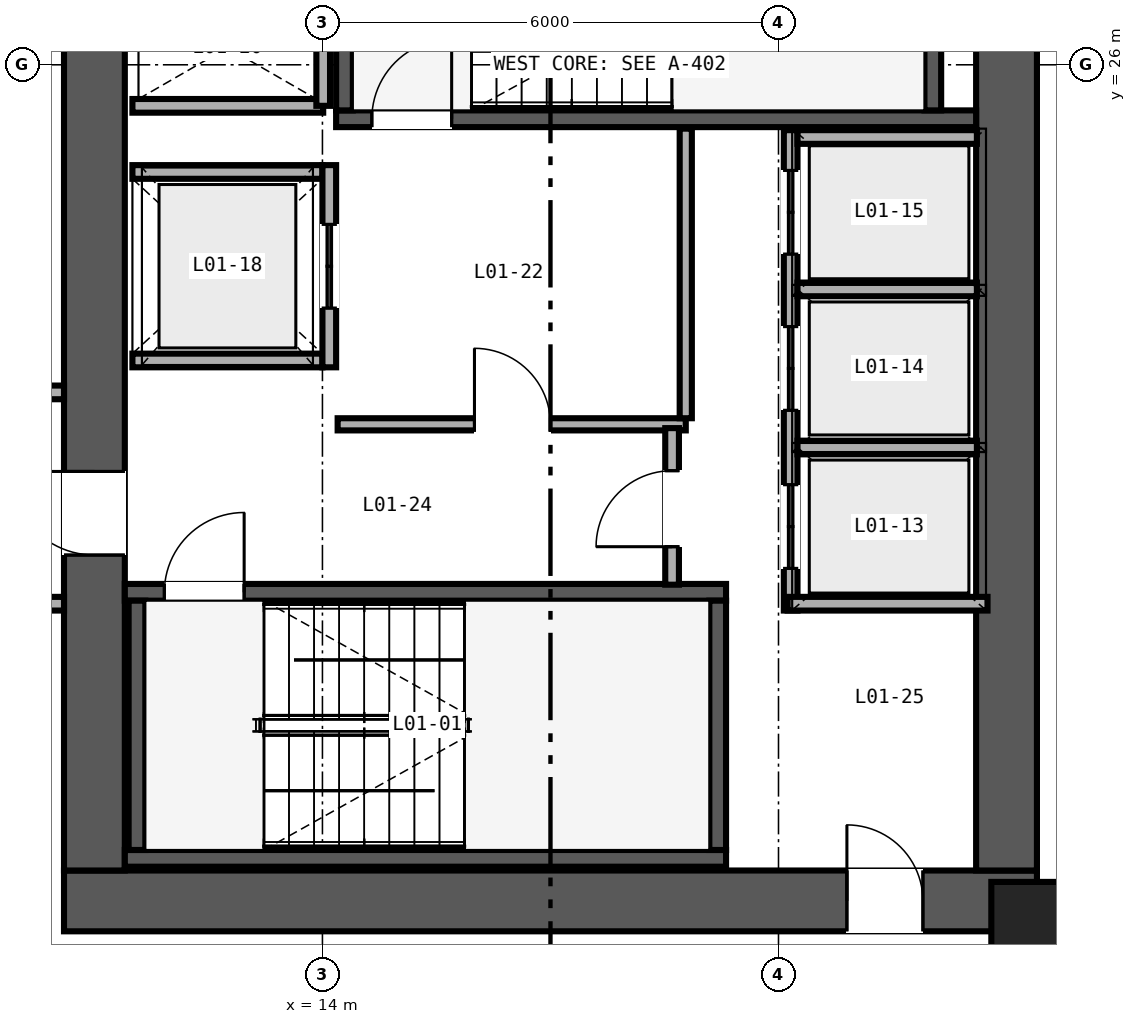
"""IFC4 building model, lengths in metres.
Left out: names, types, materials, properties, quantities, classifications, styles, units other than length and angle.
Written with IfcOpenShell. Run it as: python <this file> out.ifc"""

import sys

from ifc_helpers import new_model, si_unit, direction, frame, frame_2d, origin, origin_2d, place, context, subcontext, project, spatial, rectangle, extrude, source, transform, mapped, element, fill, save


model = new_model("IFC4")
c1 = context("Model", 3, precision=1e-05, world=origin(), true_north=direction((0.0, 1.0)))
c2 = subcontext(c1, "Body", "Model", "MODEL_VIEW")
j1 = project(units=[si_unit("LENGTHUNIT", "METRE"), si_unit("PLANEANGLEUNIT", "RADIAN")], contexts=[c1])
p1 = place(None, origin())
s1 = spatial("IfcSite", under=j1, at=p1, CompositionType="ELEMENT")
p2 = place(p1, origin())
s2 = spatial("IfcBuilding", under=s1, at=p2, CompositionType="ELEMENT")
p3 = place(p2, origin())
s3 = spatial("IfcBuildingStorey", under=s2, at=p3, CompositionType="ELEMENT", Elevation=0.0)
p4 = place(p3, frame((10.6, 15.0, 0.0), z_axis=(0.0, 0.0, 1.0), x_axis=(1.0, 0.0, 0.0)))
e1 = element("IfcWall", 1, at=p4, inside=s3, PredefinedType="SHEAR", context=c2, shape_type="SweptSolid", body=[
    extrude(rectangle(XDim=12.8, YDim=0.8, at=frame_2d((6.4, 0.0))), origin(), (0.0, 0.0, 1.0), 5.71),
])
p5 = place(p4, frame((10.3, 0.0, 0.0)))
e2 = element("IfcOpeningElement", 2, at=p5, cuts=e1, PredefinedType="OPENING", context=c2, shape_type="SweptSolid", body=[
    extrude(rectangle(XDim=1.0, YDim=2.15, at=frame_2d((0.5, 1.075))), frame((0.0, 0.41, 0.0), z_axis=(0.0, -1.0, 0.0), x_axis=(1.0, 0.0, 0.0)), (0.0, 0.0, 1.0), 0.82),
])
p6 = place(p3, frame((11.0, 15.4, 0.0), z_axis=(0.0, 0.0, 1.0), x_axis=(0.0, 1.0, 0.0)))
e3 = element("IfcWall", 3, at=p6, inside=s3, PredefinedType="SHEAR", context=c2, shape_type="SweptSolid", body=[
    extrude(rectangle(XDim=21.2, YDim=0.8, at=frame_2d((10.6, 0.0))), origin(), (0.0, 0.0, 1.0), 5.71),
])
p7 = place(p6, frame((4.15, 0.0, 0.0)))
e4 = element("IfcOpeningElement", 4, at=p7, cuts=e3, PredefinedType="OPENING", context=c2, shape_type="SweptSolid", body=[
    extrude(rectangle(XDim=1.1, YDim=2.15, at=frame_2d((0.55, 1.075))), frame((0.0, 0.41, 0.0), z_axis=(0.0, -1.0, 0.0), x_axis=(1.0, 0.0, 0.0)), (0.0, 0.0, 1.0), 0.82),
])
p8 = place(p6, frame((16.35, 0.0, 0.0)))
e5 = element("IfcOpeningElement", 5, at=p8, cuts=e3, PredefinedType="OPENING", context=c2, shape_type="SweptSolid", body=[
    extrude(rectangle(XDim=1.1, YDim=2.15, at=frame_2d((0.55, 1.075))), frame((0.0, 0.41, 0.0), z_axis=(0.0, -1.0, 0.0), x_axis=(1.0, 0.0, 0.0)), (0.0, 0.0, 1.0), 0.82),
])
p9 = place(p3, frame((23.0, 15.4, 0.0), z_axis=(0.0, 0.0, 1.0), x_axis=(0.0, 1.0, 0.0)))
e6 = element("IfcWall", 6, at=p9, inside=s3, PredefinedType="SHEAR", context=c2, shape_type="SweptSolid", body=[
    extrude(rectangle(XDim=21.2, YDim=0.8, at=frame_2d((10.6, 0.0))), origin(), (0.0, 0.0, 1.0), 5.71),
])
p10 = place(p3, frame((11.4, 15.56, 0.0), z_axis=(0.0, 0.0, 1.0), x_axis=(1.0, 0.0, 0.0)))
e7 = element("IfcWall", 7, at=p10, inside=s3, PredefinedType="SHEAR", context=c2, shape_type="SweptSolid", body=[
    extrude(rectangle(XDim=7.91, YDim=0.22, at=frame_2d((3.955, 0.0))), origin(), (0.0, 0.0, 1.0), 5.8),
])
p11 = place(p3, frame((11.4, 19.06, 0.0), z_axis=(0.0, 0.0, 1.0), x_axis=(1.0, 0.0, 0.0)))
e8 = element("IfcWall", 8, at=p11, inside=s3, PredefinedType="SHEAR", context=c2, shape_type="SweptSolid", body=[
    extrude(rectangle(XDim=7.91, YDim=0.22, at=frame_2d((3.955, 0.0))), origin(), (0.0, 0.0, 1.0), 5.8),
])
p12 = place(p11, frame((0.52, 0.0, 0.0)))
e9 = element("IfcOpeningElement", 9, at=p12, cuts=e8, PredefinedType="OPENING", context=c2, shape_type="SweptSolid", body=[
    extrude(rectangle(XDim=1.05, YDim=2.15, at=frame_2d((0.525, 1.075))), frame((0.0, 0.12, 0.0), z_axis=(0.0, -1.0, 0.0), x_axis=(1.0, 0.0, 0.0)), (0.0, 0.0, 1.0), 0.24),
])
for number, where, z_axis, x_axis in (
    (10, (11.56, 15.67, 0.0), (0.0, 0.0, 1.0), (0.0, 1.0, 0.0)),
    (11, (19.2, 15.67, 0.0), (0.0, 0.0, 1.0), (0.0, 1.0, 0.0)),
):
    element("IfcWall", number, at=place(p3, frame(where, z_axis=z_axis, x_axis=x_axis)), inside=s3, PredefinedType="SHEAR", context=c2, shape_type="SweptSolid", body=[
        extrude(rectangle(XDim=3.28, YDim=0.22, at=frame_2d((1.64, 0.0))), origin(), (0.0, 0.0, 1.0), 5.8),
    ])
p13 = place(p3, frame((14.18, 25.29, 0.0), z_axis=(0.0, 0.0, 1.0), x_axis=(1.0, 0.0, 0.0)))
e12 = element("IfcWall", 12, at=p13, inside=s3, PredefinedType="SHEAR", context=c2, shape_type="SweptSolid", body=[
    extrude(rectangle(XDim=8.42, YDim=0.22, at=frame_2d((4.21, 0.0))), origin(), (0.0, 0.0, 1.0), 5.8),
])
p14 = place(p13, frame((0.47, 0.0, 0.0)))
e13 = element("IfcOpeningElement", 13, at=p14, cuts=e12, PredefinedType="OPENING", context=c2, shape_type="SweptSolid", body=[
    extrude(rectangle(XDim=1.05, YDim=2.15, at=frame_2d((0.525, 1.075))), frame((0.0, 0.12, 0.0), z_axis=(0.0, -1.0, 0.0), x_axis=(1.0, 0.0, 0.0)), (0.0, 0.0, 1.0), 0.24),
])
for number, where, z_axis, x_axis in (
    (14, (14.29, 25.4, 0.0), (0.0, 0.0, 1.0), (0.0, 1.0, 0.0)),
    (15, (22.03, 25.4, 0.0), (0.0, 0.0, 1.0), (0.0, 1.0, 0.0)),
):
    element("IfcWall", number, at=place(p3, frame(where, z_axis=z_axis, x_axis=x_axis)), inside=s3, PredefinedType="SHEAR", context=c2, shape_type="SweptSolid", body=[
        extrude(rectangle(XDim=3.28, YDim=0.22, at=frame_2d((1.64, 0.0))), origin(), (0.0, 0.0, 1.0), 5.8),
    ])
m1 = source(origin(), c2, "Body", "SweptSolid", [
    extrude(rectangle(XDim=1.4, YDim=1.4, at=origin_2d()), origin(), (0.0, 0.0, 1.0), 5.71),
])
p15 = place(p3, frame((23.5, 14.55, 0.0), z_axis=(0.0, 0.0, 1.0), x_axis=(1.0, 0.0, 0.0)))
e16 = element("IfcColumn", 16, at=p15, inside=s3, PredefinedType="COLUMN", context=c2, shape_type="MappedRepresentation", body=[
    mapped(m1, transform((0.0, 0.0, 0.0), scale=1.0)),
])
p16 = place(p3, frame((20.16, 18.82, 0.0), z_axis=(0.0, 0.0, 1.0), x_axis=(0.0, 1.0, 0.0)))
e17 = element("IfcWall", 17, at=p16, inside=s3, PredefinedType="SOLIDWALL", context=c2, shape_type="SweptSolid", body=[
    extrude(rectangle(XDim=6.32, YDim=0.18, at=frame_2d((3.16, 0.0))), origin(), (0.0, 0.0, 1.0), 4.61),
])
p17 = place(p16, frame((0.555, 0.0, 0.0)))
e18 = element("IfcOpeningElement", 18, at=p17, cuts=e17, PredefinedType="OPENING", context=c2, shape_type="SweptSolid", body=[
    extrude(rectangle(XDim=1.1, YDim=2.2, at=frame_2d((0.55, 1.1))), frame((0.0, 0.1, 0.0), z_axis=(0.0, -1.0, 0.0), x_axis=(1.0, 0.0, 0.0)), (0.0, 0.0, 1.0), 0.2),
])
p18 = place(p16, frame((2.635, 0.0, 0.0)))
e19 = element("IfcOpeningElement", 19, at=p18, cuts=e17, PredefinedType="OPENING", context=c2, shape_type="SweptSolid", body=[
    extrude(rectangle(XDim=1.1, YDim=2.2, at=frame_2d((0.55, 1.1))), frame((0.0, 0.1, 0.0), z_axis=(0.0, -1.0, 0.0), x_axis=(1.0, 0.0, 0.0)), (0.0, 0.0, 1.0), 0.2),
])
p19 = place(p16, frame((4.69, 0.0, 0.0)))
e20 = element("IfcOpeningElement", 20, at=p19, cuts=e17, PredefinedType="OPENING", context=c2, shape_type="SweptSolid", body=[
    extrude(rectangle(XDim=1.1, YDim=2.2, at=frame_2d((0.55, 1.1))), frame((0.0, 0.1, 0.0), z_axis=(0.0, -1.0, 0.0), x_axis=(1.0, 0.0, 0.0)), (0.0, 0.0, 1.0), 0.2),
])
p20 = place(p3, frame((20.12, 18.91, 0.0), z_axis=(0.0, 0.0, 1.0), x_axis=(1.0, 0.0, 0.0)))
e21 = element("IfcWall", 21, at=p20, inside=s3, PredefinedType="SOLIDWALL", context=c2, shape_type="SweptSolid", body=[
    extrude(rectangle(XDim=2.63, YDim=0.18, at=frame_2d((1.315, 0.0))), origin(), (0.0, 0.0, 1.0), 5.71),
])
p21 = place(p3, frame((20.25, 25.05, 0.0), z_axis=(0.0, 0.0, 1.0), x_axis=(1.0, 0.0, 0.0)))
e22 = element("IfcWall", 22, at=p21, inside=s3, PredefinedType="SOLIDWALL", context=c2, shape_type="SweptSolid", body=[
    extrude(rectangle(XDim=2.36, YDim=0.18, at=frame_2d((1.18, 0.0))), origin(), (0.0, 0.0, 1.0), 5.71),
])
p22 = place(p3, frame((20.25, 20.965, 0.0), z_axis=(0.0, 0.0, 1.0), x_axis=(1.0, 0.0, 0.0)))
e23 = element("IfcWall", 23, at=p22, inside=s3, PredefinedType="SOLIDWALL", context=c2, shape_type="SweptSolid", body=[
    extrude(rectangle(XDim=2.36, YDim=0.18, at=frame_2d((1.18, 0.0))), origin(), (0.0, 0.0, 1.0), 4.61),
])
p23 = place(p3, frame((20.25, 23.045, 0.0), z_axis=(0.0, 0.0, 1.0), x_axis=(1.0, 0.0, 0.0)))
e24 = element("IfcWall", 24, at=p23, inside=s3, PredefinedType="SOLIDWALL", context=c2, shape_type="SweptSolid", body=[
    extrude(rectangle(XDim=2.36, YDim=0.18, at=frame_2d((1.18, 0.0))), origin(), (0.0, 0.0, 1.0), 5.71),
])
for number, where, z_axis, x_axis in (
    (25, (11.5, 22.11, 0.0), (0.0, 0.0, 1.0), (1.0, 0.0, 0.0)),
    (26, (11.5, 24.59, 0.0), (0.0, 0.0, 1.0), (1.0, 0.0, 0.0)),
):
    element("IfcWall", number, at=place(p3, frame(where, z_axis=z_axis, x_axis=x_axis)), inside=s3, PredefinedType="SOLIDWALL", context=c2, shape_type="SweptSolid", body=[
        extrude(rectangle(XDim=2.5, YDim=0.18, at=frame_2d((1.25, 0.0))), origin(), (0.0, 0.0, 1.0), 5.71),
    ])
p24 = place(p3, frame((14.09, 22.02, 0.0), z_axis=(0.0, 0.0, 1.0), x_axis=(0.0, 1.0, 0.0)))
e27 = element("IfcWall", 27, at=p24, inside=s3, PredefinedType="SOLIDWALL", context=c2, shape_type="SweptSolid", body=[
    extrude(rectangle(XDim=2.66, YDim=0.18, at=frame_2d((1.33, 0.0))), origin(), (0.0, 0.0, 1.0), 5.71),
])
p25 = place(p24, frame((0.78, 0.0, 0.0)))
e28 = element("IfcOpeningElement", 28, at=p25, cuts=e27, PredefinedType="OPENING", context=c2, shape_type="SweptSolid", body=[
    extrude(rectangle(XDim=1.1, YDim=2.2, at=frame_2d((0.55, 1.1))), frame((0.0, 0.1, 0.0), z_axis=(0.0, -1.0, 0.0), x_axis=(1.0, 0.0, 0.0)), (0.0, 0.0, 1.0), 0.2),
])
p26 = place(p3, frame((11.5, 25.46, 0.0), z_axis=(0.0, 0.0, 1.0), x_axis=(1.0, 0.0, 0.0)))
e29 = element("IfcWall", 29, at=p26, inside=s3, PredefinedType="SOLIDWALL", context=c2, shape_type="SweptSolid", body=[
    extrude(rectangle(XDim=2.51, YDim=0.18, at=frame_2d((1.255, 0.0))), origin(), (0.0, 0.0, 1.0), 5.71),
])
p27 = place(p3, frame((14.01, 25.46, 0.0), z_axis=(0.0, 0.0, 1.0), x_axis=(0.0, 1.0, 0.0)))
e30 = element("IfcWall", 30, at=p27, inside=s3, PredefinedType="SOLIDWALL", context=c2, shape_type="SweptSolid", body=[
    extrude(rectangle(XDim=3.08, YDim=0.18, at=frame_2d((1.54, 0.0))), origin(), (0.0, 0.0, 1.0), 5.71),
])
p28 = place(p3, frame((14.2, 21.27, 0.0), z_axis=(0.0, 0.0, 1.0), x_axis=(1.0, 0.0, 0.0)))
e31 = element("IfcWall", 31, at=p28, inside=s3, PredefinedType="PARTITIONING", context=c2, shape_type="SweptSolid", body=[
    extrude(rectangle(XDim=4.58, YDim=0.16, at=frame_2d((2.29, 0.0))), origin(), (0.0, 0.0, 1.0), 5.71),
])
p29 = place(p28, frame((1.8, 0.0, 0.0)))
e32 = element("IfcOpeningElement", 32, at=p29, cuts=e31, PredefinedType="OPENING", context=c2, shape_type="SweptSolid", body=[
    extrude(rectangle(XDim=1.0, YDim=2.15, at=frame_2d((0.5, 1.075))), frame((0.0, 0.09, 0.0), z_axis=(0.0, -1.0, 0.0), x_axis=(1.0, 0.0, 0.0)), (0.0, 0.0, 1.0), 0.18),
])
p30 = place(p3, frame((18.78, 21.35, 0.0), z_axis=(0.0, 0.0, 1.0), x_axis=(0.0, 1.0, 0.0)))
e33 = element("IfcWall", 33, at=p30, inside=s3, PredefinedType="PARTITIONING", context=c2, shape_type="SweptSolid", body=[
    extrude(rectangle(XDim=3.81, YDim=0.16, at=frame_2d((1.905, 0.0))), origin(), (0.0, 0.0, 1.0), 5.71),
])
p31 = place(p3, frame((18.6, 19.16, 0.0), z_axis=(0.0, 0.0, 1.0), x_axis=(0.0, 1.0, 0.0)))
e34 = element("IfcWall", 34, at=p31, inside=s3, PredefinedType="SOLIDWALL", context=c2, shape_type="SweptSolid", body=[
    extrude(rectangle(XDim=2.06, YDim=0.18, at=frame_2d((1.03, 0.0))), origin(), (0.0, 0.0, 1.0), 4.61),
])
p32 = place(p31, frame((0.5, 0.0, 0.0)))
e35 = element("IfcOpeningElement", 35, at=p32, cuts=e34, PredefinedType="OPENING", context=c2, shape_type="SweptSolid", body=[
    extrude(rectangle(XDim=1.0, YDim=2.15, at=frame_2d((0.5, 1.075))), frame((0.0, 0.1, 0.0), z_axis=(0.0, -1.0, 0.0), x_axis=(1.0, 0.0, 0.0)), (0.0, 0.0, 1.0), 0.2),
])
p33 = place(p3, frame((0.35, 18.91, 0.0), z_axis=(0.0, 0.0, 1.0), x_axis=(1.0, 0.0, 0.0)))
e36 = element("IfcWall", 36, at=p33, inside=s3, PredefinedType="SOLIDWALL", context=c2, shape_type="SweptSolid", body=[
    extrude(rectangle(XDim=10.25, YDim=0.18, at=frame_2d((5.125, 0.0))), origin(), (0.0, 0.0, 1.0), 4.931),
])
p34 = place(p3, frame((0.35, 21.69, 0.0), z_axis=(0.0, 0.0, 1.0), x_axis=(1.0, 0.0, 0.0)))
e37 = element("IfcWall", 37, at=p34, inside=s3, PredefinedType="SOLIDWALL", context=c2, shape_type="SweptSolid", body=[
    extrude(rectangle(XDim=10.25, YDim=0.18, at=frame_2d((5.125, 0.0))), origin(), (0.0, 0.0, 1.0), 4.931),
])
p35 = place(p34, frame((4.2, 0.0, 0.0)))
e38 = element("IfcOpeningElement", 38, at=p35, cuts=e37, PredefinedType="OPENING", context=c2, shape_type="SweptSolid", body=[
    extrude(rectangle(XDim=1.0, YDim=2.15, at=frame_2d((0.5, 1.075))), frame((0.0, 0.1, 0.0), z_axis=(0.0, -1.0, 0.0), x_axis=(1.0, 0.0, 0.0)), (0.0, 0.0, 1.0), 0.2),
])
m2 = source(origin(), c2, "Body", "SweptSolid", [
    extrude(rectangle(XDim=1.05, YDim=2.15, at=frame_2d((0.525, 1.075))), frame((0.0, 0.025, 0.0), z_axis=(0.0, -1.0, 0.0), x_axis=(1.0, 0.0, 0.0)), (0.0, 0.0, 1.0), 0.05),
])
p36 = place(p12, origin())
e39 = element("IfcDoor", 39, at=p36, inside=s3, OperationType="SINGLE_SWING_RIGHT", PredefinedType="DOOR", context=c2, shape_type="MappedRepresentation", body=[
    mapped(m2, transform((0.0, 0.0, 0.0), scale=1.0)),
])
fill(e9, e39)
p37 = place(p14, origin())
e40 = element("IfcDoor", 40, at=p37, inside=s3, OperationType="SINGLE_SWING_RIGHT", PredefinedType="DOOR", context=c2, shape_type="MappedRepresentation", body=[
    mapped(m2, transform((0.0, 0.0, 0.0), scale=1.0)),
])
fill(e13, e40)
m3 = source(origin(), c2, "Body", "SweptSolid", [
    extrude(rectangle(XDim=1.1, YDim=2.2, at=frame_2d((0.55, 1.1))), frame((0.0, 0.025, 0.0), z_axis=(0.0, -1.0, 0.0), x_axis=(1.0, 0.0, 0.0)), (0.0, 0.0, 1.0), 0.05),
])
p38 = place(p17, origin())
e41 = element("IfcDoor", 41, at=p38, inside=s3, OperationType="DOUBLE_DOOR_SLIDING", PredefinedType="DOOR", context=c2, shape_type="MappedRepresentation", body=[
    mapped(m3, transform((0.0, 0.0, 0.0), scale=1.0)),
])
fill(e18, e41)
p39 = place(p18, origin())
e42 = element("IfcDoor", 42, at=p39, inside=s3, OperationType="DOUBLE_DOOR_SLIDING", PredefinedType="DOOR", context=c2, shape_type="MappedRepresentation", body=[
    mapped(m3, transform((0.0, 0.0, 0.0), scale=1.0)),
])
fill(e19, e42)
p40 = place(p19, origin())
e43 = element("IfcDoor", 43, at=p40, inside=s3, OperationType="DOUBLE_DOOR_SLIDING", PredefinedType="DOOR", context=c2, shape_type="MappedRepresentation", body=[
    mapped(m3, transform((0.0, 0.0, 0.0), scale=1.0)),
])
fill(e20, e43)
p41 = place(p25, origin())
e44 = element("IfcDoor", 44, at=p41, inside=s3, OperationType="DOUBLE_DOOR_SLIDING", PredefinedType="DOOR", context=c2, shape_type="MappedRepresentation", body=[
    mapped(m3, transform((0.0, 0.0, 0.0), scale=1.0)),
])
fill(e28, e44)
m4 = source(origin(), c2, "Body", "SweptSolid", [
    extrude(rectangle(XDim=1.0, YDim=2.15, at=frame_2d((0.5, 1.075))), frame((0.0, 0.025, 0.0), z_axis=(0.0, -1.0, 0.0), x_axis=(1.0, 0.0, 0.0)), (0.0, 0.0, 1.0), 0.05),
])
p42 = place(p29, origin())
e45 = element("IfcDoor", 45, at=p42, inside=s3, OperationType="SINGLE_SWING_LEFT", PredefinedType="DOOR", context=c2, shape_type="MappedRepresentation", body=[
    mapped(m4, transform((0.0, 0.0, 0.0), scale=1.0)),
])
fill(e32, e45)
p43 = place(p32, origin())
e46 = element("IfcDoor", 46, at=p43, inside=s3, OperationType="SINGLE_SWING_LEFT", PredefinedType="DOOR", context=c2, shape_type="MappedRepresentation", body=[
    mapped(m4, transform((0.0, 0.0, 0.0), scale=1.0)),
])
fill(e35, e46)
m5 = source(origin(), c2, "Body", "SweptSolid", [
    extrude(rectangle(XDim=1.1, YDim=2.15, at=frame_2d((0.55, 1.075))), frame((0.0, 0.025, 0.0), z_axis=(0.0, -1.0, 0.0), x_axis=(1.0, 0.0, 0.0)), (0.0, 0.0, 1.0), 0.05),
])
p44 = place(p7, origin())
e47 = element("IfcDoor", 47, at=p44, inside=s3, OperationType="SINGLE_SWING_RIGHT", PredefinedType="DOOR", context=c2, shape_type="MappedRepresentation", body=[
    mapped(m5, transform((0.0, 0.0, 0.0), scale=1.0)),
])
fill(e4, e47)
p45 = place(p5, origin())
e48 = element("IfcDoor", 48, at=p45, inside=s3, OperationType="SINGLE_SWING_LEFT", PredefinedType="DOOR", context=c2, shape_type="MappedRepresentation", body=[
    mapped(m4, transform((0.0, 0.0, 0.0), scale=1.0)),
])
fill(e2, e48)
save(model, sys.argv[1])
